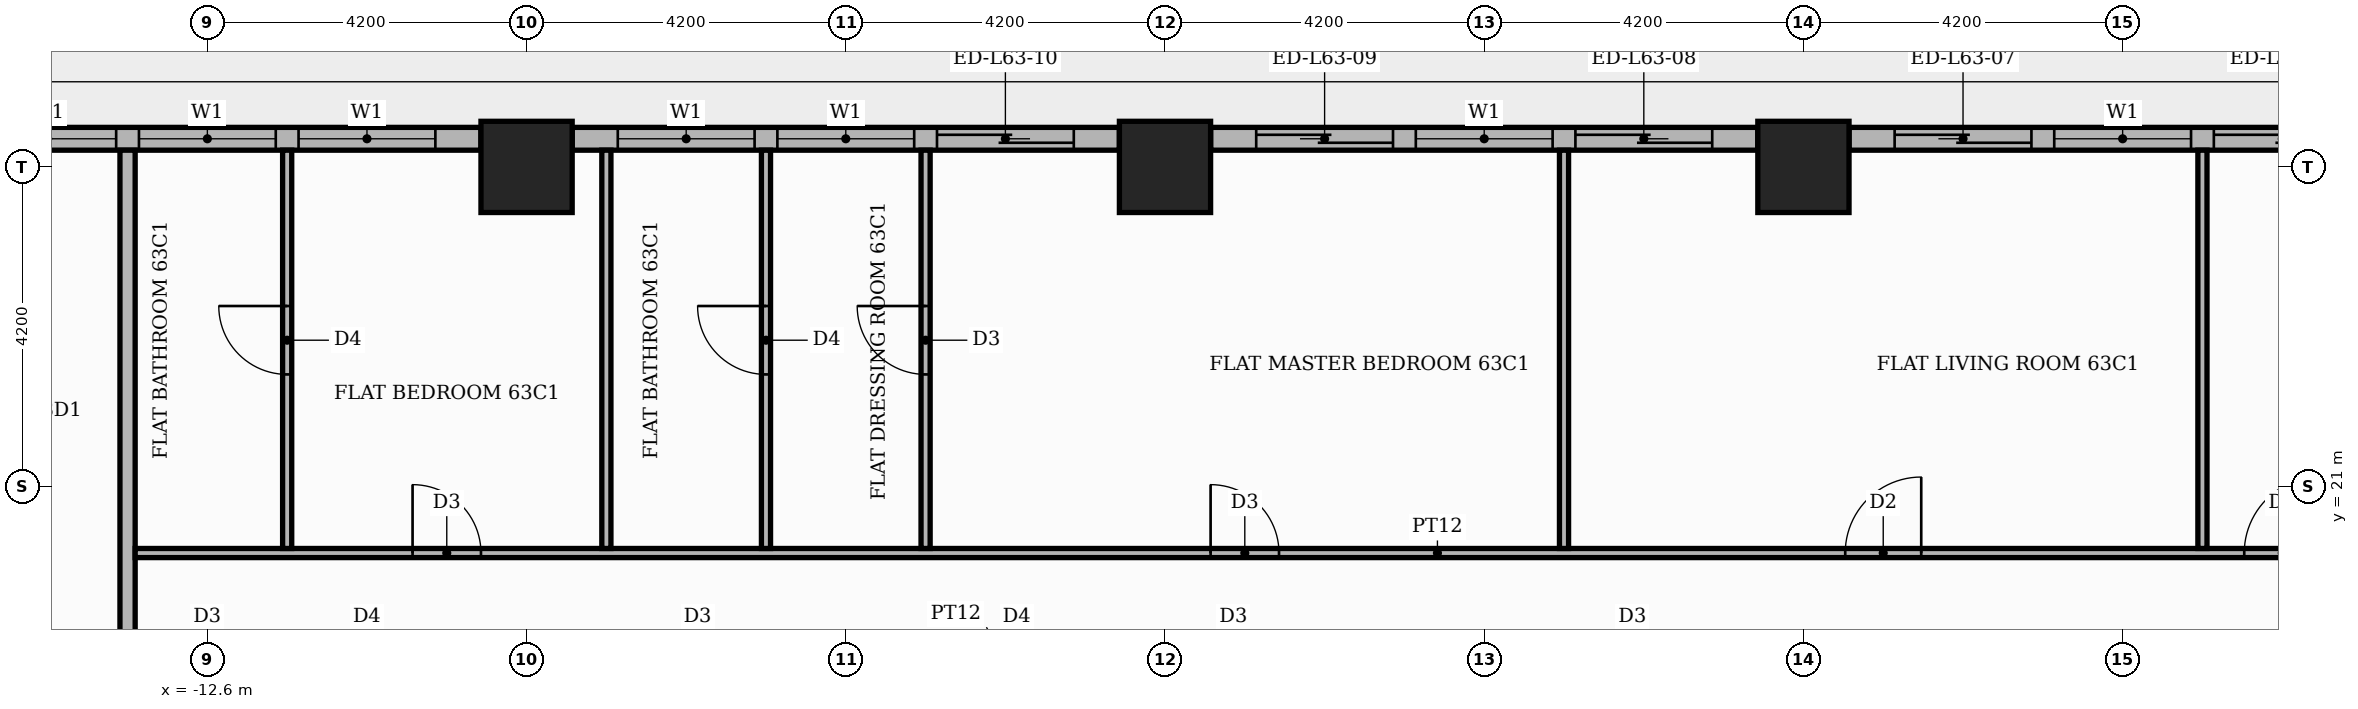
"""IFC4 building model, lengths in metres.
Left out: names, types, materials, properties, quantities, classifications, styles, units other than length and angle.
Written with IfcOpenShell. Run it as: python <this file> out.ifc"""

import sys

from ifc_helpers import new_model, si_unit, direction, frame, frame_2d, origin, origin_2d, place, context, subcontext, project, spatial, rectangle, extrude, element, fill, save


model = new_model("IFC4")
c1 = context("Model", 3, precision=1e-05, world=origin(), true_north=direction((0.0, 1.0)))
c2 = subcontext(c1, "Body", "Model", "MODEL_VIEW")
j1 = project(units=[si_unit("LENGTHUNIT", "METRE"), si_unit("PLANEANGLEUNIT", "RADIAN")], contexts=[c1])
p1 = place(None, origin())
s1 = spatial("IfcSite", under=j1, at=p1, CompositionType="ELEMENT")
p2 = place(p1, origin())
s2 = spatial("IfcBuilding", under=s1, at=p2, CompositionType="ELEMENT")
p3 = place(p2, frame((0.0, 0.0, 264.0)))
s3 = spatial("IfcBuildingStorey", under=s2, at=p3, CompositionType="ELEMENT", Elevation=264.0)
for number, where, z_axis, x_axis in (
    (1, (0.0, 25.2, 0.0), (0.0, 0.0, 1.0), (1.0, 0.0, 0.0)),
    (2, (-8.4, 25.2, 0.0), (0.0, 0.0, 1.0), (1.0, 0.0, 0.0)),
    (3, (8.4, 25.2, 0.0), (0.0, 0.0, 1.0), (1.0, 0.0, 0.0)),
):
    element("IfcColumn", number, at=place(p3, frame(where, z_axis=z_axis, x_axis=x_axis)), inside=s3, PredefinedType="COLUMN", context=c2, shape_type="SweptSolid", body=[
        extrude(rectangle(XDim=1.2, YDim=1.2, at=origin_2d()), origin(), (0.0, 0.0, 1.0), 3.9),
    ])
p4 = place(p3, frame((16.2, 25.57, 0.0), z_axis=(0.0, 0.0, 1.0), x_axis=(-1.0, 0.0, 0.0)))
e4 = element("IfcWall", 4, at=p4, inside=s3, PredefinedType="STANDARD", context=c2, shape_type="SweptSolid", body=[
    extrude(rectangle(XDim=7.2, YDim=0.3, at=frame_2d((3.6, 0.0))), origin(), (0.0, 0.0, 1.0), 3.48),
])
p5 = place(p4, frame((0.6, 0.0, 0.0)))
e5 = element("IfcOpeningElement", 5, at=p5, cuts=e4, PredefinedType="OPENING", context=c2, shape_type="SweptSolid", body=[
    extrude(rectangle(XDim=1.8, YDim=2.4, at=frame_2d((0.9, 1.2))), frame((0.0, 0.16, 0.0), z_axis=(0.0, -1.0, 0.0), x_axis=(1.0, 0.0, 0.0)), (0.0, 0.0, 1.0), 0.32),
])
p6 = place(p4, frame((2.7, 0.0, 0.9)))
e6 = element("IfcOpeningElement", 6, at=p6, cuts=e4, PredefinedType="OPENING", context=c2, shape_type="SweptSolid", body=[
    extrude(rectangle(XDim=1.8, YDim=2.1, at=frame_2d((0.9, 1.05))), frame((0.0, 0.16, 0.0), z_axis=(0.0, -1.0, 0.0), x_axis=(1.0, 0.0, 0.0)), (0.0, 0.0, 1.0), 0.32),
])
p7 = place(p4, frame((4.8, 0.0, 0.0)))
e7 = element("IfcOpeningElement", 7, at=p7, cuts=e4, PredefinedType="OPENING", context=c2, shape_type="SweptSolid", body=[
    extrude(rectangle(XDim=1.8, YDim=2.4, at=frame_2d((0.9, 1.2))), frame((0.0, 0.16, 0.0), z_axis=(0.0, -1.0, 0.0), x_axis=(1.0, 0.0, 0.0)), (0.0, 0.0, 1.0), 0.32),
])
p8 = place(p3, frame((7.8, 25.57, 0.0), z_axis=(0.0, 0.0, 1.0), x_axis=(-1.0, 0.0, 0.0)))
e8 = element("IfcWall", 8, at=p8, inside=s3, PredefinedType="STANDARD", context=c2, shape_type="SweptSolid", body=[
    extrude(rectangle(XDim=7.2, YDim=0.3, at=frame_2d((3.6, 0.0))), origin(), (0.0, 0.0, 1.0), 3.48),
])
p9 = place(p8, frame((0.6, 0.0, 0.0)))
e9 = element("IfcOpeningElement", 9, at=p9, cuts=e8, PredefinedType="OPENING", context=c2, shape_type="SweptSolid", body=[
    extrude(rectangle(XDim=1.8, YDim=2.4, at=frame_2d((0.9, 1.2))), frame((0.0, 0.16, 0.0), z_axis=(0.0, -1.0, 0.0), x_axis=(1.0, 0.0, 0.0)), (0.0, 0.0, 1.0), 0.32),
])
p10 = place(p8, frame((2.7, 0.0, 0.9)))
e10 = element("IfcOpeningElement", 10, at=p10, cuts=e8, PredefinedType="OPENING", context=c2, shape_type="SweptSolid", body=[
    extrude(rectangle(XDim=1.8, YDim=2.1, at=frame_2d((0.9, 1.05))), frame((0.0, 0.16, 0.0), z_axis=(0.0, -1.0, 0.0), x_axis=(1.0, 0.0, 0.0)), (0.0, 0.0, 1.0), 0.32),
])
p11 = place(p8, frame((4.8, 0.0, 0.0)))
e11 = element("IfcOpeningElement", 11, at=p11, cuts=e8, PredefinedType="OPENING", context=c2, shape_type="SweptSolid", body=[
    extrude(rectangle(XDim=1.8, YDim=2.4, at=frame_2d((0.9, 1.2))), frame((0.0, 0.16, 0.0), z_axis=(0.0, -1.0, 0.0), x_axis=(1.0, 0.0, 0.0)), (0.0, 0.0, 1.0), 0.32),
])
p12 = place(p3, frame((-0.6, 25.57, 0.0), z_axis=(0.0, 0.0, 1.0), x_axis=(-1.0, 0.0, 0.0)))
e12 = element("IfcWall", 12, at=p12, inside=s3, PredefinedType="STANDARD", context=c2, shape_type="SweptSolid", body=[
    extrude(rectangle(XDim=7.2, YDim=0.3, at=frame_2d((3.6, 0.0))), origin(), (0.0, 0.0, 1.0), 3.48),
])
p13 = place(p12, frame((0.6, 0.0, 0.0)))
e13 = element("IfcOpeningElement", 13, at=p13, cuts=e12, PredefinedType="OPENING", context=c2, shape_type="SweptSolid", body=[
    extrude(rectangle(XDim=1.8, YDim=2.4, at=frame_2d((0.9, 1.2))), frame((0.0, 0.16, 0.0), z_axis=(0.0, -1.0, 0.0), x_axis=(1.0, 0.0, 0.0)), (0.0, 0.0, 1.0), 0.32),
])
p14 = place(p12, frame((2.7, 0.0, 0.9)))
e14 = element("IfcOpeningElement", 14, at=p14, cuts=e12, PredefinedType="OPENING", context=c2, shape_type="SweptSolid", body=[
    extrude(rectangle(XDim=1.8, YDim=2.1, at=frame_2d((0.9, 1.05))), frame((0.0, 0.16, 0.0), z_axis=(0.0, -1.0, 0.0), x_axis=(1.0, 0.0, 0.0)), (0.0, 0.0, 1.0), 0.32),
])
p15 = place(p12, frame((4.8, 0.0, 0.9)))
e15 = element("IfcOpeningElement", 15, at=p15, cuts=e12, PredefinedType="OPENING", context=c2, shape_type="SweptSolid", body=[
    extrude(rectangle(XDim=1.8, YDim=2.1, at=frame_2d((0.9, 1.05))), frame((0.0, 0.16, 0.0), z_axis=(0.0, -1.0, 0.0), x_axis=(1.0, 0.0, 0.0)), (0.0, 0.0, 1.0), 0.32),
])
p16 = place(p3, frame((-9.0, 25.57, 0.0), z_axis=(0.0, 0.0, 1.0), x_axis=(-1.0, 0.0, 0.0)))
e16 = element("IfcWall", 16, at=p16, inside=s3, PredefinedType="STANDARD", context=c2, shape_type="SweptSolid", body=[
    extrude(rectangle(XDim=7.2, YDim=0.3, at=frame_2d((3.6, 0.0))), origin(), (0.0, 0.0, 1.0), 3.48),
])
p17 = place(p16, frame((0.6, 0.0, 0.9)))
e17 = element("IfcOpeningElement", 17, at=p17, cuts=e16, PredefinedType="OPENING", context=c2, shape_type="SweptSolid", body=[
    extrude(rectangle(XDim=1.8, YDim=2.1, at=frame_2d((0.9, 1.05))), frame((0.0, 0.16, 0.0), z_axis=(0.0, -1.0, 0.0), x_axis=(1.0, 0.0, 0.0)), (0.0, 0.0, 1.0), 0.32),
])
p18 = place(p16, frame((2.7, 0.0, 0.9)))
e18 = element("IfcOpeningElement", 18, at=p18, cuts=e16, PredefinedType="OPENING", context=c2, shape_type="SweptSolid", body=[
    extrude(rectangle(XDim=1.8, YDim=2.1, at=frame_2d((0.9, 1.05))), frame((0.0, 0.16, 0.0), z_axis=(0.0, -1.0, 0.0), x_axis=(1.0, 0.0, 0.0)), (0.0, 0.0, 1.0), 0.32),
])
p19 = place(p16, frame((4.8, 0.0, 0.9)))
e19 = element("IfcOpeningElement", 19, at=p19, cuts=e16, PredefinedType="OPENING", context=c2, shape_type="SweptSolid", body=[
    extrude(rectangle(XDim=1.8, YDim=2.1, at=frame_2d((0.9, 1.05))), frame((0.0, 0.16, 0.0), z_axis=(0.0, -1.0, 0.0), x_axis=(1.0, 0.0, 0.0)), (0.0, 0.0, 1.0), 0.32),
])
p20 = place(p3, frame((-13.65, 13.75, 0.0), z_axis=(0.0, 0.0, 1.0), x_axis=(0.0, 1.0, 0.0)))
e20 = element("IfcWall", 20, at=p20, inside=s3, PredefinedType="PARTITIONING", context=c2, shape_type="SweptSolid", body=[
    extrude(rectangle(XDim=11.67, YDim=0.2, at=frame_2d((5.835, 0.0))), origin(), (0.0, 0.0, 1.0), 3.48),
])
p21 = place(p3, frame((-13.55, 20.12, 0.0), z_axis=(0.0, 0.0, 1.0), x_axis=(1.0, 0.0, 0.0)))
e21 = element("IfcWall", 21, at=p21, inside=s3, PredefinedType="PARTITIONING", context=c2, shape_type="SweptSolid", body=[
    extrude(rectangle(XDim=34.269, YDim=0.12, at=frame_2d((17.135, 0.0))), origin(), (0.0, 0.0, 1.0), 3.48),
])
p22 = place(p21, frame((27.75, 0.0, 0.0)))
e22 = element("IfcOpeningElement", 22, at=p22, cuts=e21, PredefinedType="OPENING", context=c2, shape_type="SweptSolid", body=[
    extrude(rectangle(XDim=1.0, YDim=2.1, at=frame_2d((0.5, 1.05))), frame((0.0, 0.07, 0.0), z_axis=(0.0, -1.0, 0.0), x_axis=(1.0, 0.0, 0.0)), (0.0, 0.0, 1.0), 0.14),
])
p23 = place(p21, frame((22.5, 0.0, 0.0)))
e23 = element("IfcOpeningElement", 23, at=p23, cuts=e21, PredefinedType="OPENING", context=c2, shape_type="SweptSolid", body=[
    extrude(rectangle(XDim=1.0, YDim=2.1, at=frame_2d((0.5, 1.05))), frame((0.0, 0.07, 0.0), z_axis=(0.0, -1.0, 0.0), x_axis=(1.0, 0.0, 0.0)), (0.0, 0.0, 1.0), 0.14),
])
p24 = place(p21, frame((14.15, 0.0, 0.0)))
e24 = element("IfcOpeningElement", 24, at=p24, cuts=e21, PredefinedType="OPENING", context=c2, shape_type="SweptSolid", body=[
    extrude(rectangle(XDim=0.9, YDim=2.1, at=frame_2d((0.45, 1.05))), frame((0.0, 0.07, 0.0), z_axis=(0.0, -1.0, 0.0), x_axis=(1.0, 0.0, 0.0)), (0.0, 0.0, 1.0), 0.14),
])
p25 = place(p21, frame((3.65, 0.0, 0.0)))
e25 = element("IfcOpeningElement", 25, at=p25, cuts=e21, PredefinedType="OPENING", context=c2, shape_type="SweptSolid", body=[
    extrude(rectangle(XDim=0.9, YDim=2.1, at=frame_2d((0.45, 1.05))), frame((0.0, 0.07, 0.0), z_axis=(0.0, -1.0, 0.0), x_axis=(1.0, 0.0, 0.0)), (0.0, 0.0, 1.0), 0.14),
])
p26 = place(p3, frame((-11.55, 20.18, 0.0), z_axis=(0.0, 0.0, 1.0), x_axis=(0.0, 1.0, 0.0)))
e26 = element("IfcWall", 26, at=p26, inside=s3, PredefinedType="PARTITIONING", context=c2, shape_type="SweptSolid", body=[
    extrude(rectangle(XDim=5.24, YDim=0.12, at=frame_2d((2.62, 0.0))), origin(), (0.0, 0.0, 1.0), 3.48),
])
p27 = place(p26, frame((2.29, 0.0, 0.0)))
e27 = element("IfcOpeningElement", 27, at=p27, cuts=e26, PredefinedType="OPENING", context=c2, shape_type="SweptSolid", body=[
    extrude(rectangle(XDim=0.9, YDim=2.1, at=frame_2d((0.45, 1.05))), frame((0.0, 0.07, 0.0), z_axis=(0.0, -1.0, 0.0), x_axis=(1.0, 0.0, 0.0)), (0.0, 0.0, 1.0), 0.14),
])
p28 = place(p3, frame((-7.35, 20.18, 0.0), z_axis=(0.0, 0.0, 1.0), x_axis=(0.0, 1.0, 0.0)))
e28 = element("IfcWall", 28, at=p28, inside=s3, PredefinedType="PARTITIONING", context=c2, shape_type="SweptSolid", body=[
    extrude(rectangle(XDim=5.24, YDim=0.12, at=frame_2d((2.62, 0.0))), origin(), (0.0, 0.0, 1.0), 3.48),
])
p29 = place(p3, frame((-5.25, 20.18, 0.0), z_axis=(0.0, 0.0, 1.0), x_axis=(0.0, 1.0, 0.0)))
e29 = element("IfcWall", 29, at=p29, inside=s3, PredefinedType="PARTITIONING", context=c2, shape_type="SweptSolid", body=[
    extrude(rectangle(XDim=5.24, YDim=0.12, at=frame_2d((2.62, 0.0))), origin(), (0.0, 0.0, 1.0), 3.48),
])
p30 = place(p29, frame((2.29, 0.0, 0.0)))
e30 = element("IfcOpeningElement", 30, at=p30, cuts=e29, PredefinedType="OPENING", context=c2, shape_type="SweptSolid", body=[
    extrude(rectangle(XDim=0.9, YDim=2.1, at=frame_2d((0.45, 1.05))), frame((0.0, 0.07, 0.0), z_axis=(0.0, -1.0, 0.0), x_axis=(1.0, 0.0, 0.0)), (0.0, 0.0, 1.0), 0.14),
])
p31 = place(p3, frame((-3.15, 20.18, 0.0), z_axis=(0.0, 0.0, 1.0), x_axis=(0.0, 1.0, 0.0)))
e31 = element("IfcWall", 31, at=p31, inside=s3, PredefinedType="PARTITIONING", context=c2, shape_type="SweptSolid", body=[
    extrude(rectangle(XDim=5.24, YDim=0.12, at=frame_2d((2.62, 0.0))), origin(), (0.0, 0.0, 1.0), 3.48),
])
p32 = place(p31, frame((2.29, 0.0, 0.0)))
e32 = element("IfcOpeningElement", 32, at=p32, cuts=e31, PredefinedType="OPENING", context=c2, shape_type="SweptSolid", body=[
    extrude(rectangle(XDim=0.9, YDim=2.1, at=frame_2d((0.45, 1.05))), frame((0.0, 0.07, 0.0), z_axis=(0.0, -1.0, 0.0), x_axis=(1.0, 0.0, 0.0)), (0.0, 0.0, 1.0), 0.14),
])
for number, where, z_axis, x_axis in (
    (33, (5.25, 20.18, 0.0), (0.0, 0.0, 1.0), (0.0, 1.0, 0.0)),
    (34, (13.65, 20.18, 0.0), (0.0, 0.0, 1.0), (0.0, 1.0, 0.0)),
):
    element("IfcWall", number, at=place(p3, frame(where, z_axis=z_axis, x_axis=x_axis)), inside=s3, PredefinedType="PARTITIONING", context=c2, shape_type="SweptSolid", body=[
        extrude(rectangle(XDim=5.24, YDim=0.12, at=frame_2d((2.62, 0.0))), origin(), (0.0, 0.0, 1.0), 3.48),
    ])
p33 = place(p5, origin())
e35 = element("IfcDoor", 35, at=p33, inside=s3, OperationType="SLIDING_TO_LEFT", PredefinedType="DOOR", context=c2, shape_type="SweptSolid", body=[
    extrude(rectangle(XDim=1.8, YDim=2.4, at=frame_2d((0.9, 1.2))), frame((0.0, 0.025, 0.0), z_axis=(0.0, -1.0, 0.0), x_axis=(1.0, 0.0, 0.0)), (0.0, 0.0, 1.0), 0.05),
])
fill(e5, e35)
p34 = place(p6, origin())
e36 = element("IfcWindow", 36, at=p34, inside=s3, PartitioningType="SINGLE_PANEL", PredefinedType="WINDOW", context=c2, shape_type="SweptSolid", body=[
    extrude(rectangle(XDim=1.8, YDim=2.1, at=frame_2d((0.9, 1.05))), frame((0.0, 0.03, 0.0), z_axis=(0.0, -1.0, 0.0), x_axis=(1.0, 0.0, 0.0)), (0.0, 0.0, 1.0), 0.06),
])
fill(e6, e36)
p35 = place(p7, origin())
e37 = element("IfcDoor", 37, at=p35, inside=s3, OperationType="SLIDING_TO_RIGHT", PredefinedType="DOOR", context=c2, shape_type="SweptSolid", body=[
    extrude(rectangle(XDim=1.8, YDim=2.4, at=frame_2d((0.9, 1.2))), frame((0.0, 0.025, 0.0), z_axis=(0.0, -1.0, 0.0), x_axis=(1.0, 0.0, 0.0)), (0.0, 0.0, 1.0), 0.05),
])
fill(e7, e37)
p36 = place(p9, origin())
e38 = element("IfcDoor", 38, at=p36, inside=s3, OperationType="SLIDING_TO_LEFT", PredefinedType="DOOR", context=c2, shape_type="SweptSolid", body=[
    extrude(rectangle(XDim=1.8, YDim=2.4, at=frame_2d((0.9, 1.2))), frame((0.0, 0.025, 0.0), z_axis=(0.0, -1.0, 0.0), x_axis=(1.0, 0.0, 0.0)), (0.0, 0.0, 1.0), 0.05),
])
fill(e9, e38)
p37 = place(p10, origin())
e39 = element("IfcWindow", 39, at=p37, inside=s3, PartitioningType="SINGLE_PANEL", PredefinedType="WINDOW", context=c2, shape_type="SweptSolid", body=[
    extrude(rectangle(XDim=1.8, YDim=2.1, at=frame_2d((0.9, 1.05))), frame((0.0, 0.03, 0.0), z_axis=(0.0, -1.0, 0.0), x_axis=(1.0, 0.0, 0.0)), (0.0, 0.0, 1.0), 0.06),
])
fill(e10, e39)
p38 = place(p11, origin())
e40 = element("IfcDoor", 40, at=p38, inside=s3, OperationType="SLIDING_TO_RIGHT", PredefinedType="DOOR", context=c2, shape_type="SweptSolid", body=[
    extrude(rectangle(XDim=1.8, YDim=2.4, at=frame_2d((0.9, 1.2))), frame((0.0, 0.025, 0.0), z_axis=(0.0, -1.0, 0.0), x_axis=(1.0, 0.0, 0.0)), (0.0, 0.0, 1.0), 0.05),
])
fill(e11, e40)
p39 = place(p13, origin())
e41 = element("IfcDoor", 41, at=p39, inside=s3, OperationType="SLIDING_TO_LEFT", PredefinedType="DOOR", context=c2, shape_type="SweptSolid", body=[
    extrude(rectangle(XDim=1.8, YDim=2.4, at=frame_2d((0.9, 1.2))), frame((0.0, 0.025, 0.0), z_axis=(0.0, -1.0, 0.0), x_axis=(1.0, 0.0, 0.0)), (0.0, 0.0, 1.0), 0.05),
])
fill(e13, e41)
p40 = place(p14, origin())
e42 = element("IfcWindow", 42, at=p40, inside=s3, PartitioningType="SINGLE_PANEL", PredefinedType="WINDOW", context=c2, shape_type="SweptSolid", body=[
    extrude(rectangle(XDim=1.8, YDim=2.1, at=frame_2d((0.9, 1.05))), frame((0.0, 0.03, 0.0), z_axis=(0.0, -1.0, 0.0), x_axis=(1.0, 0.0, 0.0)), (0.0, 0.0, 1.0), 0.06),
])
fill(e14, e42)
p41 = place(p15, origin())
e43 = element("IfcWindow", 43, at=p41, inside=s3, PartitioningType="SINGLE_PANEL", PredefinedType="WINDOW", context=c2, shape_type="SweptSolid", body=[
    extrude(rectangle(XDim=1.8, YDim=2.1, at=frame_2d((0.9, 1.05))), frame((0.0, 0.03, 0.0), z_axis=(0.0, -1.0, 0.0), x_axis=(1.0, 0.0, 0.0)), (0.0, 0.0, 1.0), 0.06),
])
fill(e15, e43)
p42 = place(p17, origin())
e44 = element("IfcWindow", 44, at=p42, inside=s3, PartitioningType="SINGLE_PANEL", PredefinedType="WINDOW", context=c2, shape_type="SweptSolid", body=[
    extrude(rectangle(XDim=1.8, YDim=2.1, at=frame_2d((0.9, 1.05))), frame((0.0, 0.03, 0.0), z_axis=(0.0, -1.0, 0.0), x_axis=(1.0, 0.0, 0.0)), (0.0, 0.0, 1.0), 0.06),
])
fill(e17, e44)
p43 = place(p18, origin())
e45 = element("IfcWindow", 45, at=p43, inside=s3, PartitioningType="SINGLE_PANEL", PredefinedType="WINDOW", context=c2, shape_type="SweptSolid", body=[
    extrude(rectangle(XDim=1.8, YDim=2.1, at=frame_2d((0.9, 1.05))), frame((0.0, 0.03, 0.0), z_axis=(0.0, -1.0, 0.0), x_axis=(1.0, 0.0, 0.0)), (0.0, 0.0, 1.0), 0.06),
])
fill(e18, e45)
p44 = place(p19, origin())
e46 = element("IfcWindow", 46, at=p44, inside=s3, PartitioningType="SINGLE_PANEL", PredefinedType="WINDOW", context=c2, shape_type="SweptSolid", body=[
    extrude(rectangle(XDim=1.8, YDim=2.1, at=frame_2d((0.9, 1.05))), frame((0.0, 0.03, 0.0), z_axis=(0.0, -1.0, 0.0), x_axis=(1.0, 0.0, 0.0)), (0.0, 0.0, 1.0), 0.06),
])
fill(e19, e46)
p45 = place(p22, origin())
e47 = element("IfcDoor", 47, at=p45, inside=s3, OperationType="SINGLE_SWING_RIGHT", PredefinedType="DOOR", context=c2, shape_type="SweptSolid", body=[
    extrude(rectangle(XDim=1.0, YDim=2.1, at=frame_2d((0.5, 1.05))), frame((0.0, 0.025, 0.0), z_axis=(0.0, -1.0, 0.0), x_axis=(1.0, 0.0, 0.0)), (0.0, 0.0, 1.0), 0.05),
])
fill(e22, e47)
p46 = place(p23, origin())
e48 = element("IfcDoor", 48, at=p46, inside=s3, OperationType="SINGLE_SWING_RIGHT", PredefinedType="DOOR", context=c2, shape_type="SweptSolid", body=[
    extrude(rectangle(XDim=1.0, YDim=2.1, at=frame_2d((0.5, 1.05))), frame((0.0, 0.025, 0.0), z_axis=(0.0, -1.0, 0.0), x_axis=(1.0, 0.0, 0.0)), (0.0, 0.0, 1.0), 0.05),
])
fill(e23, e48)
p47 = place(p24, origin())
e49 = element("IfcDoor", 49, at=p47, inside=s3, OperationType="SINGLE_SWING_LEFT", PredefinedType="DOOR", context=c2, shape_type="SweptSolid", body=[
    extrude(rectangle(XDim=0.9, YDim=2.1, at=frame_2d((0.45, 1.05))), frame((0.0, 0.025, 0.0), z_axis=(0.0, -1.0, 0.0), x_axis=(1.0, 0.0, 0.0)), (0.0, 0.0, 1.0), 0.05),
])
fill(e24, e49)
p48 = place(p32, origin())
e50 = element("IfcDoor", 50, at=p48, inside=s3, OperationType="SINGLE_SWING_RIGHT", PredefinedType="DOOR", context=c2, shape_type="SweptSolid", body=[
    extrude(rectangle(XDim=0.9, YDim=2.1, at=frame_2d((0.45, 1.05))), frame((0.0, 0.025, 0.0), z_axis=(0.0, -1.0, 0.0), x_axis=(1.0, 0.0, 0.0)), (0.0, 0.0, 1.0), 0.05),
])
fill(e32, e50)
p49 = place(p30, origin())
e51 = element("IfcDoor", 51, at=p49, inside=s3, OperationType="SINGLE_SWING_RIGHT", PredefinedType="DOOR", context=c2, shape_type="SweptSolid", body=[
    extrude(rectangle(XDim=0.9, YDim=2.1, at=frame_2d((0.45, 1.05))), frame((0.0, 0.025, 0.0), z_axis=(0.0, -1.0, 0.0), x_axis=(1.0, 0.0, 0.0)), (0.0, 0.0, 1.0), 0.05),
])
fill(e30, e51)
p50 = place(p25, origin())
e52 = element("IfcDoor", 52, at=p50, inside=s3, OperationType="SINGLE_SWING_LEFT", PredefinedType="DOOR", context=c2, shape_type="SweptSolid", body=[
    extrude(rectangle(XDim=0.9, YDim=2.1, at=frame_2d((0.45, 1.05))), frame((0.0, 0.025, 0.0), z_axis=(0.0, -1.0, 0.0), x_axis=(1.0, 0.0, 0.0)), (0.0, 0.0, 1.0), 0.05),
])
fill(e25, e52)
p51 = place(p27, origin())
e53 = element("IfcDoor", 53, at=p51, inside=s3, OperationType="SINGLE_SWING_RIGHT", PredefinedType="DOOR", context=c2, shape_type="SweptSolid", body=[
    extrude(rectangle(XDim=0.9, YDim=2.1, at=frame_2d((0.45, 1.05))), frame((0.0, 0.025, 0.0), z_axis=(0.0, -1.0, 0.0), x_axis=(1.0, 0.0, 0.0)), (0.0, 0.0, 1.0), 0.05),
])
fill(e27, e53)
save(model, sys.argv[1])
